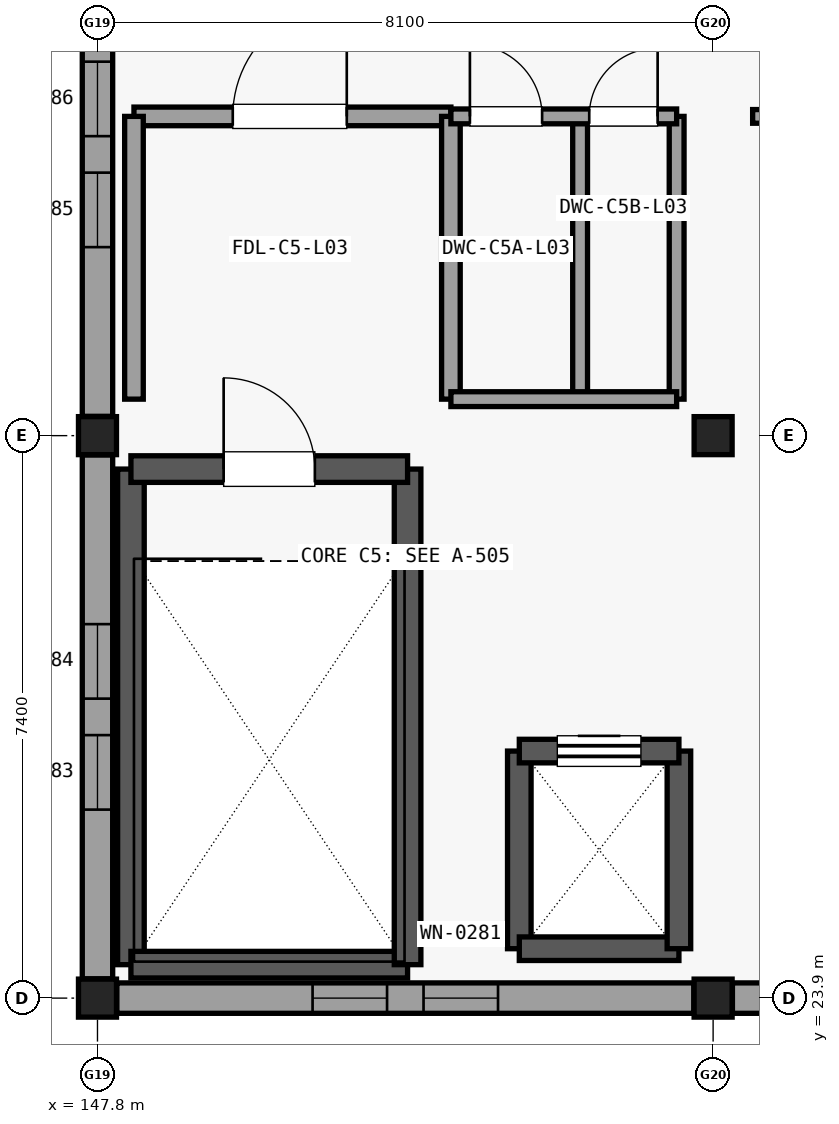
"""IFC4 building model, lengths in metres.
Left out: names, types, materials, properties, quantities, classifications, styles, units other than length and angle.
Written with IfcOpenShell. Run it as: python <this file> out.ifc"""

import sys

from ifc_helpers import new_model, si_unit, direction, frame, frame_2d, origin, origin_2d, place, context, subcontext, project, spatial, rectangle, extrude, element, fill, save


model = new_model("IFC4")
c1 = context("Model", 3, precision=1e-05, world=origin(), true_north=direction((0.0, 1.0)))
c2 = subcontext(c1, "Body", "Model", "MODEL_VIEW")
j1 = project(units=[si_unit("LENGTHUNIT", "METRE"), si_unit("PLANEANGLEUNIT", "RADIAN")], contexts=[c1])
p1 = place(None, origin())
s1 = spatial("IfcSite", under=j1, at=p1, CompositionType="ELEMENT")
p2 = place(p1, origin())
s2 = spatial("IfcBuilding", under=s1, at=p2, CompositionType="ELEMENT")
p3 = place(p2, frame((0.0, 0.0, 13.8)))
s3 = spatial("IfcBuildingStorey", under=s2, at=p3, CompositionType="ELEMENT", Elevation=13.8)
for number, where, z_axis, x_axis in (
    (1, (147.8, 23.9, 0.0), (0.0, 0.0, 1.0), (1.0, 0.0, 0.0)),
    (2, (147.8, 31.3, 0.0), (0.0, 0.0, 1.0), (1.0, 0.0, 0.0)),
    (3, (155.9, 23.9, 0.0), (0.0, 0.0, 1.0), (1.0, 0.0, 0.0)),
    (4, (155.9, 31.3, 0.0), (0.0, 0.0, 1.0), (1.0, 0.0, 0.0)),
):
    element("IfcColumn", number, at=place(p3, frame(where, z_axis=z_axis, x_axis=x_axis)), inside=s3, PredefinedType="COLUMN", context=c2, shape_type="SweptSolid", body=[
        extrude(rectangle(XDim=0.5, YDim=0.5, at=origin_2d()), origin(), (0.0, 0.0, 1.0), 3.38),
    ])
p4 = place(p3, frame((155.646, 23.9, 0.0), z_axis=(0.0, 0.0, 1.0), x_axis=(-1.0, 0.0, 0.0)))
e5 = element("IfcWall", 5, at=p4, inside=s3, PredefinedType="SOLIDWALL", context=c2, shape_type="SweptSolid", body=[
    extrude(rectangle(XDim=7.592, YDim=0.4, at=frame_2d((3.796, 0.0))), origin(), (0.0, 0.0, 1.0), 2.908),
])
p5 = place(p4, frame((2.576, 0.0, 0.6)))
e6 = element("IfcOpeningElement", 6, at=p5, cuts=e5, PredefinedType="OPENING", context=c2, shape_type="SweptSolid", body=[
    extrude(rectangle(XDim=0.98, YDim=1.95, at=frame_2d((0.49, 0.975))), frame((0.0, 0.21, 0.0), z_axis=(0.0, -1.0, 0.0), x_axis=(1.0, 0.0, 0.0)), (0.0, 0.0, 1.0), 0.42),
])
p6 = place(p4, frame((4.036, 0.0, 0.6)))
e7 = element("IfcOpeningElement", 7, at=p6, cuts=e5, PredefinedType="OPENING", context=c2, shape_type="SweptSolid", body=[
    extrude(rectangle(XDim=0.98, YDim=1.95, at=frame_2d((0.49, 0.975))), frame((0.0, 0.21, 0.0), z_axis=(0.0, -1.0, 0.0), x_axis=(1.0, 0.0, 0.0)), (0.0, 0.0, 1.0), 0.42),
])
p7 = place(p3, frame((147.8, 24.154, 0.0), z_axis=(0.0, 0.0, 1.0), x_axis=(0.0, 1.0, 0.0)))
e8 = element("IfcWall", 8, at=p7, inside=s3, PredefinedType="SOLIDWALL", context=c2, shape_type="SweptSolid", body=[
    extrude(rectangle(XDim=6.892, YDim=0.4, at=frame_2d((3.446, 0.0))), origin(), (0.0, 0.0, 1.0), 2.908),
])
p8 = place(p7, frame((2.226, 0.0, 0.6)))
e9 = element("IfcOpeningElement", 9, at=p8, cuts=e8, PredefinedType="OPENING", context=c2, shape_type="SweptSolid", body=[
    extrude(rectangle(XDim=0.98, YDim=1.95, at=frame_2d((0.49, 0.975))), frame((0.0, 0.21, 0.0), z_axis=(0.0, -1.0, 0.0), x_axis=(1.0, 0.0, 0.0)), (0.0, 0.0, 1.0), 0.42),
])
p9 = place(p7, frame((3.686, 0.0, 0.6)))
e10 = element("IfcOpeningElement", 10, at=p9, cuts=e8, PredefinedType="OPENING", context=c2, shape_type="SweptSolid", body=[
    extrude(rectangle(XDim=0.98, YDim=1.95, at=frame_2d((0.49, 0.975))), frame((0.0, 0.21, 0.0), z_axis=(0.0, -1.0, 0.0), x_axis=(1.0, 0.0, 0.0)), (0.0, 0.0, 1.0), 0.42),
])
p10 = place(p3, frame((147.8, 31.554, 0.0), z_axis=(0.0, 0.0, 1.0), x_axis=(0.0, 1.0, 0.0)))
e11 = element("IfcWall", 11, at=p10, inside=s3, PredefinedType="SOLIDWALL", context=c2, shape_type="SweptSolid", body=[
    extrude(rectangle(XDim=6.892, YDim=0.4, at=frame_2d((3.446, 0.0))), origin(), (0.0, 0.0, 1.0), 2.908),
])
p11 = place(p10, frame((2.226, 0.0, 0.6)))
e12 = element("IfcOpeningElement", 12, at=p11, cuts=e11, PredefinedType="OPENING", context=c2, shape_type="SweptSolid", body=[
    extrude(rectangle(XDim=0.98, YDim=1.95, at=frame_2d((0.49, 0.975))), frame((0.0, 0.21, 0.0), z_axis=(0.0, -1.0, 0.0), x_axis=(1.0, 0.0, 0.0)), (0.0, 0.0, 1.0), 0.42),
])
p12 = place(p10, frame((3.686, 0.0, 0.6)))
e13 = element("IfcOpeningElement", 13, at=p12, cuts=e11, PredefinedType="OPENING", context=c2, shape_type="SweptSolid", body=[
    extrude(rectangle(XDim=0.98, YDim=1.95, at=frame_2d((0.49, 0.975))), frame((0.0, 0.21, 0.0), z_axis=(0.0, -1.0, 0.0), x_axis=(1.0, 0.0, 0.0)), (0.0, 0.0, 1.0), 0.42),
])
p13 = place(p3, frame((163.746, 23.9, 0.0), z_axis=(0.0, 0.0, 1.0), x_axis=(-1.0, 0.0, 0.0)))
e14 = element("IfcWall", 14, at=p13, inside=s3, PredefinedType="SOLIDWALL", context=c2, shape_type="SweptSolid", body=[
    extrude(rectangle(XDim=7.592, YDim=0.4, at=frame_2d((3.796, 0.0))), origin(), (0.0, 0.0, 1.0), 2.908),
])
p14 = place(p13, frame((2.576, 0.0, 0.6)))
e15 = element("IfcOpeningElement", 15, at=p14, cuts=e14, PredefinedType="OPENING", context=c2, shape_type="SweptSolid", body=[
    extrude(rectangle(XDim=0.98, YDim=1.95, at=frame_2d((0.49, 0.975))), frame((0.0, 0.21, 0.0), z_axis=(0.0, -1.0, 0.0), x_axis=(1.0, 0.0, 0.0)), (0.0, 0.0, 1.0), 0.42),
])
p15 = place(p13, frame((4.036, 0.0, 0.6)))
e16 = element("IfcOpeningElement", 16, at=p15, cuts=e14, PredefinedType="OPENING", context=c2, shape_type="SweptSolid", body=[
    extrude(rectangle(XDim=0.98, YDim=1.95, at=frame_2d((0.49, 0.975))), frame((0.0, 0.21, 0.0), z_axis=(0.0, -1.0, 0.0), x_axis=(1.0, 0.0, 0.0)), (0.0, 0.0, 1.0), 0.42),
])
p16 = place(p3, frame((148.24, 24.34, 0.0), z_axis=(0.0, 0.0, 1.0), x_axis=(0.0, 1.0, 0.0)))
e17 = element("IfcWall", 17, at=p16, inside=s3, PredefinedType="SHEAR", context=c2, shape_type="SweptSolid", body=[
    extrude(rectangle(XDim=6.52, YDim=0.35, at=frame_2d((3.26, 0.0))), origin(), (0.0, 0.0, 1.0), 3.375),
])
p17 = place(p3, frame((148.24, 24.34, 0.0), z_axis=(0.0, 0.0, 1.0), x_axis=(1.0, 0.0, 0.0)))
e18 = element("IfcWall", 18, at=p17, inside=s3, PredefinedType="SHEAR", context=c2, shape_type="SweptSolid", body=[
    extrude(rectangle(XDim=3.64, YDim=0.35, at=frame_2d((1.82, 0.0))), origin(), (0.0, 0.0, 1.0), 3.375),
])
p18 = place(p3, frame((151.88, 24.34, 0.0), z_axis=(0.0, 0.0, 1.0), x_axis=(0.0, 1.0, 0.0)))
e19 = element("IfcWall", 19, at=p18, inside=s3, PredefinedType="SHEAR", context=c2, shape_type="SweptSolid", body=[
    extrude(rectangle(XDim=6.52, YDim=0.35, at=frame_2d((3.26, 0.0))), origin(), (0.0, 0.0, 1.0), 3.375),
])
p19 = place(p3, frame((148.24, 30.86, 0.0), z_axis=(0.0, 0.0, 1.0), x_axis=(1.0, 0.0, 0.0)))
e20 = element("IfcWall", 20, at=p19, inside=s3, PredefinedType="SHEAR", context=c2, shape_type="SweptSolid", body=[
    extrude(rectangle(XDim=3.64, YDim=0.35, at=frame_2d((1.82, 0.0))), origin(), (0.0, 0.0, 1.0), 3.375),
])
p20 = place(p19, frame((1.22, 0.0, 0.0)))
e21 = element("IfcOpeningElement", 21, at=p20, cuts=e20, PredefinedType="OPENING", context=c2, shape_type="SweptSolid", body=[
    extrude(rectangle(XDim=1.2, YDim=2.15, at=frame_2d((0.6, 1.075))), frame((0.0, 0.185, 0.0), z_axis=(0.0, -1.0, 0.0), x_axis=(1.0, 0.0, 0.0)), (0.0, 0.0, 1.0), 0.37),
])
p21 = place(p3, frame((153.35, 24.55, 0.0), z_axis=(0.0, 0.0, 1.0), x_axis=(0.0, 1.0, 0.0)))
e22 = element("IfcWall", 22, at=p21, inside=s3, PredefinedType="SHEAR", context=c2, shape_type="SweptSolid", body=[
    extrude(rectangle(XDim=2.6, YDim=0.31, at=frame_2d((1.3, 0.0))), origin(), (0.0, 0.0, 1.0), 3.375),
])
p22 = place(p3, frame((153.35, 24.55, 0.0), z_axis=(0.0, 0.0, 1.0), x_axis=(1.0, 0.0, 0.0)))
e23 = element("IfcWall", 23, at=p22, inside=s3, PredefinedType="SHEAR", context=c2, shape_type="SweptSolid", body=[
    extrude(rectangle(XDim=2.1, YDim=0.31, at=frame_2d((1.05, 0.0))), origin(), (0.0, 0.0, 1.0), 3.375),
])
p23 = place(p3, frame((155.45, 24.55, 0.0), z_axis=(0.0, 0.0, 1.0), x_axis=(0.0, 1.0, 0.0)))
e24 = element("IfcWall", 24, at=p23, inside=s3, PredefinedType="SHEAR", context=c2, shape_type="SweptSolid", body=[
    extrude(rectangle(XDim=2.6, YDim=0.31, at=frame_2d((1.3, 0.0))), origin(), (0.0, 0.0, 1.0), 3.375),
])
p24 = place(p3, frame((153.35, 27.15, 0.0), z_axis=(0.0, 0.0, 1.0), x_axis=(1.0, 0.0, 0.0)))
e25 = element("IfcWall", 25, at=p24, inside=s3, PredefinedType="SHEAR", context=c2, shape_type="SweptSolid", body=[
    extrude(rectangle(XDim=2.1, YDim=0.31, at=frame_2d((1.05, 0.0))), origin(), (0.0, 0.0, 1.0), 3.375),
])
p25 = place(p24, frame((0.5, 0.0, 0.0)))
e26 = element("IfcOpeningElement", 26, at=p25, cuts=e25, PredefinedType="OPENING", context=c2, shape_type="SweptSolid", body=[
    extrude(rectangle(XDim=1.1, YDim=2.15, at=frame_2d((0.55, 1.075))), frame((0.0, 0.165, 0.0), z_axis=(0.0, -1.0, 0.0), x_axis=(1.0, 0.0, 0.0)), (0.0, 0.0, 1.0), 0.33),
])
p26 = place(p3, frame((148.28, 35.5, 0.0), z_axis=(0.0, 0.0, 1.0), x_axis=(1.0, 0.0, 0.0)))
e27 = element("IfcWall", 27, at=p26, inside=s3, PredefinedType="PARTITIONING", context=c2, shape_type="SweptSolid", body=[
    extrude(rectangle(XDim=4.17, YDim=0.245, at=frame_2d((2.085, 0.0))), origin(), (0.0, 0.0, 1.0), 2.913),
])
p27 = place(p26, frame((1.3, 0.0, 0.0)))
e28 = element("IfcOpeningElement", 28, at=p27, cuts=e27, PredefinedType="OPENING", context=c2, shape_type="SweptSolid", body=[
    extrude(rectangle(XDim=1.5, YDim=2.15, at=frame_2d((0.75, 1.075))), frame((0.0, 0.133, 0.0), z_axis=(0.0, -1.0, 0.0), x_axis=(1.0, 0.0, 0.0)), (0.0, 0.0, 1.0), 0.265),
])
for number, where, z_axis, x_axis in (
    (29, (148.28, 31.78, 0.0), (0.0, 0.0, 1.0), (0.0, 1.0, 0.0)),
    (30, (152.45, 31.78, 0.0), (0.0, 0.0, 1.0), (0.0, 1.0, 0.0)),
):
    element("IfcWall", number, at=place(p3, frame(where, z_axis=z_axis, x_axis=x_axis)), inside=s3, PredefinedType="PARTITIONING", context=c2, shape_type="SweptSolid", body=[
        extrude(rectangle(XDim=3.72, YDim=0.245, at=frame_2d((1.86, 0.0))), origin(), (0.0, 0.0, 1.0), 2.913),
    ])
for number, where, z_axis, x_axis in (
    (31, (154.15, 31.78, 0.0), (0.0, 0.0, 1.0), (0.0, 1.0, 0.0)),
    (32, (155.42, 31.78, 0.0), (0.0, 0.0, 1.0), (0.0, 1.0, 0.0)),
):
    element("IfcWall", number, at=place(p3, frame(where, z_axis=z_axis, x_axis=x_axis)), inside=s3, PredefinedType="PARTITIONING", context=c2, shape_type="SweptSolid", body=[
        extrude(rectangle(XDim=3.72, YDim=0.195, at=frame_2d((1.86, 0.0))), origin(), (0.0, 0.0, 1.0), 2.913),
    ])
p28 = place(p3, frame((152.45, 31.78, 0.0), z_axis=(0.0, 0.0, 1.0), x_axis=(1.0, 0.0, 0.0)))
e33 = element("IfcWall", 33, at=p28, inside=s3, PredefinedType="PARTITIONING", context=c2, shape_type="SweptSolid", body=[
    extrude(rectangle(XDim=2.97, YDim=0.195, at=frame_2d((1.485, 0.0))), origin(), (0.0, 0.0, 1.0), 2.913),
])
p29 = place(p3, frame((152.45, 35.5, 0.0), z_axis=(0.0, 0.0, 1.0), x_axis=(1.0, 0.0, 0.0)))
e34 = element("IfcWall", 34, at=p29, inside=s3, PredefinedType="PARTITIONING", context=c2, shape_type="SweptSolid", body=[
    extrude(rectangle(XDim=2.97, YDim=0.195, at=frame_2d((1.485, 0.0))), origin(), (0.0, 0.0, 1.0), 2.913),
])
p30 = place(p29, frame((0.25, 0.0, 0.0)))
e35 = element("IfcOpeningElement", 35, at=p30, cuts=e34, PredefinedType="OPENING", context=c2, shape_type="SweptSolid", body=[
    extrude(rectangle(XDim=0.95, YDim=2.1, at=frame_2d((0.475, 1.05))), frame((0.0, 0.107, 0.0), z_axis=(0.0, -1.0, 0.0), x_axis=(1.0, 0.0, 0.0)), (0.0, 0.0, 1.0), 0.215),
])
p31 = place(p29, frame((1.82, 0.0, 0.0)))
e36 = element("IfcOpeningElement", 36, at=p31, cuts=e34, PredefinedType="OPENING", context=c2, shape_type="SweptSolid", body=[
    extrude(rectangle(XDim=0.9, YDim=2.1, at=frame_2d((0.45, 1.05))), frame((0.0, 0.107, 0.0), z_axis=(0.0, -1.0, 0.0), x_axis=(1.0, 0.0, 0.0)), (0.0, 0.0, 1.0), 0.215),
])
p32 = place(p3, frame((156.42, 35.5, 0.0), z_axis=(0.0, 0.0, 1.0), x_axis=(1.0, 0.0, 0.0)))
e37 = element("IfcWall", 37, at=p32, inside=s3, PredefinedType="PARTITIONING", context=c2, shape_type="SweptSolid", body=[
    extrude(rectangle(XDim=7.06, YDim=0.18, at=frame_2d((3.53, 0.0))), origin(), (0.0, 0.0, 1.0), 2.913),
])
p33 = place(p32, frame((2.955, 0.0, 0.0)))
e38 = element("IfcOpeningElement", 38, at=p33, cuts=e37, PredefinedType="OPENING", context=c2, shape_type="SweptSolid", body=[
    extrude(rectangle(XDim=1.15, YDim=2.15, at=frame_2d((0.575, 1.075))), frame((0.0, 0.1, 0.0), z_axis=(0.0, -1.0, 0.0), x_axis=(1.0, 0.0, 0.0)), (0.0, 0.0, 1.0), 0.2),
])
p34 = place(p5, origin())
e39 = element("IfcWindow", 39, at=p34, inside=s3, PartitioningType="SINGLE_PANEL", PredefinedType="WINDOW", context=c2, shape_type="SweptSolid", body=[
    extrude(rectangle(XDim=0.98, YDim=1.95, at=frame_2d((0.49, 0.975))), frame((0.0, 0.03, 0.0), z_axis=(0.0, -1.0, 0.0), x_axis=(1.0, 0.0, 0.0)), (0.0, 0.0, 1.0), 0.06),
])
fill(e6, e39)
p35 = place(p6, origin())
e40 = element("IfcWindow", 40, at=p35, inside=s3, PartitioningType="SINGLE_PANEL", PredefinedType="WINDOW", context=c2, shape_type="SweptSolid", body=[
    extrude(rectangle(XDim=0.98, YDim=1.95, at=frame_2d((0.49, 0.975))), frame((0.0, 0.03, 0.0), z_axis=(0.0, -1.0, 0.0), x_axis=(1.0, 0.0, 0.0)), (0.0, 0.0, 1.0), 0.06),
])
fill(e7, e40)
p36 = place(p8, origin())
e41 = element("IfcWindow", 41, at=p36, inside=s3, PartitioningType="SINGLE_PANEL", PredefinedType="WINDOW", context=c2, shape_type="SweptSolid", body=[
    extrude(rectangle(XDim=0.98, YDim=1.95, at=frame_2d((0.49, 0.975))), frame((0.0, 0.03, 0.0), z_axis=(0.0, -1.0, 0.0), x_axis=(1.0, 0.0, 0.0)), (0.0, 0.0, 1.0), 0.06),
])
fill(e9, e41)
p37 = place(p9, origin())
e42 = element("IfcWindow", 42, at=p37, inside=s3, PartitioningType="SINGLE_PANEL", PredefinedType="WINDOW", context=c2, shape_type="SweptSolid", body=[
    extrude(rectangle(XDim=0.98, YDim=1.95, at=frame_2d((0.49, 0.975))), frame((0.0, 0.03, 0.0), z_axis=(0.0, -1.0, 0.0), x_axis=(1.0, 0.0, 0.0)), (0.0, 0.0, 1.0), 0.06),
])
fill(e10, e42)
p38 = place(p11, origin())
e43 = element("IfcWindow", 43, at=p38, inside=s3, PartitioningType="SINGLE_PANEL", PredefinedType="WINDOW", context=c2, shape_type="SweptSolid", body=[
    extrude(rectangle(XDim=0.98, YDim=1.95, at=frame_2d((0.49, 0.975))), frame((0.0, 0.03, 0.0), z_axis=(0.0, -1.0, 0.0), x_axis=(1.0, 0.0, 0.0)), (0.0, 0.0, 1.0), 0.06),
])
fill(e12, e43)
p39 = place(p12, origin())
e44 = element("IfcWindow", 44, at=p39, inside=s3, PartitioningType="SINGLE_PANEL", PredefinedType="WINDOW", context=c2, shape_type="SweptSolid", body=[
    extrude(rectangle(XDim=0.98, YDim=1.95, at=frame_2d((0.49, 0.975))), frame((0.0, 0.03, 0.0), z_axis=(0.0, -1.0, 0.0), x_axis=(1.0, 0.0, 0.0)), (0.0, 0.0, 1.0), 0.06),
])
fill(e13, e44)
p40 = place(p20, origin())
e45 = element("IfcDoor", 45, at=p40, inside=s3, OperationType="SINGLE_SWING_LEFT", PredefinedType="DOOR", context=c2, shape_type="SweptSolid", body=[
    extrude(rectangle(XDim=1.2, YDim=2.15, at=frame_2d((0.6, 1.075))), frame((0.0, 0.025, 0.0), z_axis=(0.0, -1.0, 0.0), x_axis=(1.0, 0.0, 0.0)), (0.0, 0.0, 1.0), 0.05),
])
fill(e21, e45)
p41 = place(p25, origin())
e46 = element("IfcDoor", 46, at=p41, inside=s3, OperationType="SLIDING_TO_RIGHT", PredefinedType="DOOR", context=c2, shape_type="SweptSolid", body=[
    extrude(rectangle(XDim=1.1, YDim=2.15, at=frame_2d((0.55, 1.075))), frame((0.0, 0.025, 0.0), z_axis=(0.0, -1.0, 0.0), x_axis=(1.0, 0.0, 0.0)), (0.0, 0.0, 1.0), 0.05),
])
fill(e26, e46)
p42 = place(p27, origin())
e47 = element("IfcDoor", 47, at=p42, inside=s3, OperationType="SINGLE_SWING_RIGHT", PredefinedType="DOOR", context=c2, shape_type="SweptSolid", body=[
    extrude(rectangle(XDim=1.5, YDim=2.15, at=frame_2d((0.75, 1.075))), frame((0.0, 0.025, 0.0), z_axis=(0.0, -1.0, 0.0), x_axis=(1.0, 0.0, 0.0)), (0.0, 0.0, 1.0), 0.05),
])
fill(e28, e47)
p43 = place(p30, origin())
e48 = element("IfcDoor", 48, at=p43, inside=s3, OperationType="SINGLE_SWING_LEFT", PredefinedType="DOOR", context=c2, shape_type="SweptSolid", body=[
    extrude(rectangle(XDim=0.95, YDim=2.1, at=frame_2d((0.475, 1.05))), frame((0.0, 0.025, 0.0), z_axis=(0.0, -1.0, 0.0), x_axis=(1.0, 0.0, 0.0)), (0.0, 0.0, 1.0), 0.05),
])
fill(e35, e48)
p44 = place(p31, origin())
e49 = element("IfcDoor", 49, at=p44, inside=s3, OperationType="SINGLE_SWING_RIGHT", PredefinedType="DOOR", context=c2, shape_type="SweptSolid", body=[
    extrude(rectangle(XDim=0.9, YDim=2.1, at=frame_2d((0.45, 1.05))), frame((0.0, 0.025, 0.0), z_axis=(0.0, -1.0, 0.0), x_axis=(1.0, 0.0, 0.0)), (0.0, 0.0, 1.0), 0.05),
])
fill(e36, e49)
save(model, sys.argv[1])
